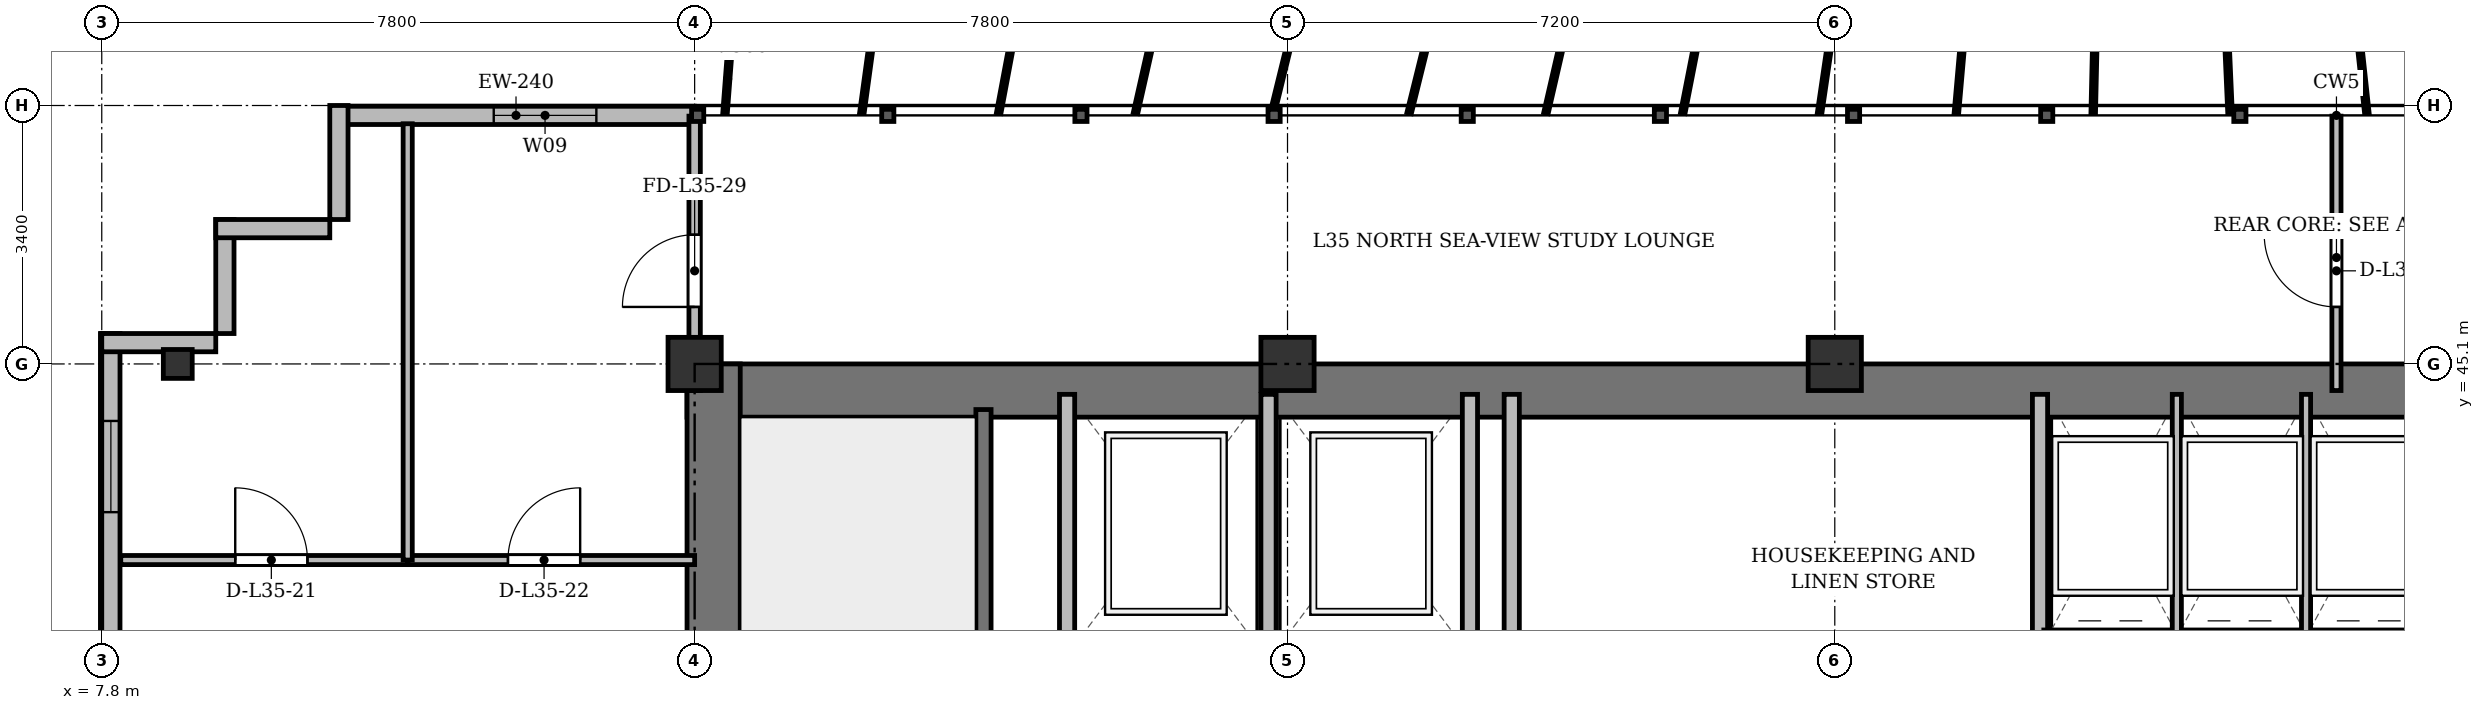
"""IFC4 building model, lengths in metres.
Left out: names, types, materials, properties, quantities, classifications, styles, units other than length and angle.
Written with IfcOpenShell. Run it as: python <this file> out.ifc"""

import sys

from ifc_helpers import new_model, si_unit, direction, frame, frame_2d, origin, origin_2d, place, context, subcontext, project, spatial, rectangle, i_section, extrude, source, transform, mapped, element, fill, save


model = new_model("IFC4")
c1 = context("Model", 3, precision=1e-05, world=origin(), true_north=direction((0.0, 1.0)))
c2 = subcontext(c1, "Body", "Model", "MODEL_VIEW")
j1 = project(units=[si_unit("LENGTHUNIT", "METRE"), si_unit("PLANEANGLEUNIT", "RADIAN")], contexts=[c1])
p1 = place(None, origin())
s1 = spatial("IfcSite", under=j1, at=p1, CompositionType="ELEMENT")
p2 = place(p1, origin())
s2 = spatial("IfcBuilding", under=s1, at=p2, CompositionType="ELEMENT")
p3 = place(p2, frame((0.0, 0.0, 135.7)))
s3 = spatial("IfcBuildingStorey", under=s2, at=p3, CompositionType="ELEMENT", Elevation=135.7)
m1 = source(origin(), c2, "Body", "SweptSolid", [
    extrude(i_section(OverallWidth=0.38, OverallDepth=0.38, WebThickness=0.02, FlangeThickness=0.03, at=origin_2d()), origin(), (0.0, 0.0, 1.0), 3.6),
])
p4 = place(p3, frame((8.8, 45.1, 0.0), z_axis=(0.0, 0.0, 1.0), x_axis=(1.0, 0.0, 0.0)))
e1 = element("IfcColumn", 1, at=p4, inside=s3, PredefinedType="COLUMN", context=c2, shape_type="MappedRepresentation", body=[
    mapped(m1, transform((0.0, 0.0, 0.0), x_axis=(1.0, 0.0, 0.0), y_axis=(0.0, 1.0, 0.0), z_axis=(0.0, 0.0, 1.0), scale=1.0)),
])
m2 = source(origin(), c2, "Body", "SweptSolid", [
    extrude(rectangle(XDim=0.7, YDim=0.7, at=origin_2d()), origin(), (0.0, 0.0, 1.0), 3.6),
])
for number, where, z_axis, x_axis in (
    (2, (15.6, 45.1, 0.0), (0.0, 0.0, 1.0), (1.0, 0.0, 0.0)),
    (3, (23.4, 45.1, 0.0), (0.0, 0.0, 1.0), (1.0, 0.0, 0.0)),
    (4, (30.6, 45.1, 0.0), (0.0, 0.0, 1.0), (1.0, 0.0, 0.0)),
):
    element("IfcColumn", number, at=place(p3, frame(where, z_axis=z_axis, x_axis=x_axis)), inside=s3, PredefinedType="COLUMN", context=c2, shape_type="MappedRepresentation", body=[
        mapped(m2, transform((0.0, 0.0, 0.0), x_axis=(1.0, 0.0, 0.0), y_axis=(0.0, 1.0, 0.0), z_axis=(0.0, 0.0, 1.0), scale=1.0)),
    ])
p5 = place(p3, frame((10.9, 48.37, 0.0), z_axis=(0.0, 0.0, 1.0), x_axis=(1.0, 0.0, 0.0)))
e5 = element("IfcWall", 5, at=p5, inside=s3, PredefinedType="SOLIDWALL", context=c2, shape_type="SweptSolid", body=[
    extrude(rectangle(XDim=4.7, YDim=0.24, at=frame_2d((2.35, 0.0))), origin(), (0.0, 0.0, 1.0), 3.35),
])
p6 = place(p5, frame((2.057, 0.0, 0.9)))
e6 = element("IfcOpeningElement", 6, at=p6, cuts=e5, PredefinedType="OPENING", context=c2, shape_type="SweptSolid", body=[
    extrude(rectangle(XDim=1.35, YDim=1.5, at=frame_2d((0.675, 0.75))), frame((0.0, 0.13, 0.0), z_axis=(0.0, -1.0, 0.0), x_axis=(1.0, 0.0, 0.0)), (0.0, 0.0, 1.0), 0.26),
])
p7 = place(p3, frame((7.92, 6.3, 0.0), z_axis=(0.0, 0.0, 1.0), x_axis=(0.0, 1.0, 0.0)))
e7 = element("IfcWall", 7, at=p7, inside=s3, PredefinedType="SOLIDWALL", context=c2, shape_type="SweptSolid", body=[
    extrude(rectangle(XDim=39.2, YDim=0.24, at=frame_2d((19.6, 0.0))), origin(), (0.0, 0.0, 1.0), 3.35),
])
p8 = place(p7, frame((1.45, 0.0, 0.92)))
e8 = element("IfcOpeningElement", 8, at=p8, cuts=e7, PredefinedType="OPENING", context=c2, shape_type="SweptSolid", body=[
    extrude(rectangle(XDim=1.2, YDim=1.65, at=frame_2d((0.6, 0.825))), frame((0.0, 0.13, 0.0), z_axis=(0.0, -1.0, 0.0), x_axis=(1.0, 0.0, 0.0)), (0.0, 0.0, 1.0), 0.26),
])
p9 = place(p7, frame((3.9, 0.0, 0.92)))
e9 = element("IfcOpeningElement", 9, at=p9, cuts=e7, PredefinedType="OPENING", context=c2, shape_type="SweptSolid", body=[
    extrude(rectangle(XDim=2.4, YDim=2.1, at=frame_2d((1.2, 1.05))), frame((0.0, 0.13, 0.0), z_axis=(0.0, -1.0, 0.0), x_axis=(1.0, 0.0, 0.0)), (0.0, 0.0, 1.0), 0.26),
])
p10 = place(p7, frame((8.1, 0.0, 0.92)))
e10 = element("IfcOpeningElement", 10, at=p10, cuts=e7, PredefinedType="OPENING", context=c2, shape_type="SweptSolid", body=[
    extrude(rectangle(XDim=2.4, YDim=2.1, at=frame_2d((1.2, 1.05))), frame((0.0, 0.13, 0.0), z_axis=(0.0, -1.0, 0.0), x_axis=(1.0, 0.0, 0.0)), (0.0, 0.0, 1.0), 0.26),
])
p11 = place(p7, frame((15.3, 0.0, 0.92)))
e11 = element("IfcOpeningElement", 11, at=p11, cuts=e7, PredefinedType="OPENING", context=c2, shape_type="SweptSolid", body=[
    extrude(rectangle(XDim=2.4, YDim=2.1, at=frame_2d((1.2, 1.05))), frame((0.0, 0.13, 0.0), z_axis=(0.0, -1.0, 0.0), x_axis=(1.0, 0.0, 0.0)), (0.0, 0.0, 1.0), 0.26),
])
p12 = place(p7, frame((33.5, 0.0, 0.92)))
e12 = element("IfcOpeningElement", 12, at=p12, cuts=e7, PredefinedType="OPENING", context=c2, shape_type="SweptSolid", body=[
    extrude(rectangle(XDim=1.2, YDim=1.65, at=frame_2d((0.6, 0.825))), frame((0.0, 0.13, 0.0), z_axis=(0.0, -1.0, 0.0), x_axis=(1.0, 0.0, 0.0)), (0.0, 0.0, 1.0), 0.26),
])
p13 = place(p7, frame((36.85, 0.0, 0.92)))
e13 = element("IfcOpeningElement", 13, at=p13, cuts=e7, PredefinedType="OPENING", context=c2, shape_type="SweptSolid", body=[
    extrude(rectangle(XDim=1.2, YDim=1.65, at=frame_2d((0.6, 0.825))), frame((0.0, 0.13, 0.0), z_axis=(0.0, -1.0, 0.0), x_axis=(1.0, 0.0, 0.0)), (0.0, 0.0, 1.0), 0.26),
])
for number, where, z_axis, x_axis in (
    (14, (7.8, 45.38, 0.0), (0.0, 0.0, 1.0), (1.0, 0.0, 0.0)),
    (15, (9.42, 45.5, 0.0), (0.0, 0.0, 1.0), (0.0, 1.0, 0.0)),
    (16, (9.3, 46.88, 0.0), (0.0, 0.0, 1.0), (1.0, 0.0, 0.0)),
    (17, (10.92, 47.0, 0.0), (0.0, 0.0, 1.0), (0.0, 1.0, 0.0)),
):
    element("IfcWall", number, at=place(p3, frame(where, z_axis=z_axis, x_axis=x_axis)), inside=s3, PredefinedType="SOLIDWALL", context=c2, shape_type="SweptSolid", body=[
        extrude(rectangle(XDim=1.5, YDim=0.24, at=frame_2d((0.75, 0.0))), origin(), (0.0, 0.0, 1.0), 3.35),
    ])
p14 = place(p3, frame((15.5, 44.75, 0.0), z_axis=(0.0, 0.0, 1.0), x_axis=(1.0, 0.0, 0.0)))
e18 = element("IfcWall", 18, at=p14, inside=s3, PredefinedType="SHEAR", context=c2, shape_type="SweptSolid", body=[
    extrude(rectangle(XDim=43.4, YDim=0.7, at=frame_2d((21.7, 0.0))), origin(), (0.0, 0.0, 1.0), 3.35),
])
p15 = place(p3, frame((15.85, 33.4, 0.0), z_axis=(0.0, 0.0, 1.0), x_axis=(0.0, 1.0, 0.0)))
e19 = element("IfcWall", 19, at=p15, inside=s3, PredefinedType="SHEAR", context=c2, shape_type="SweptSolid", body=[
    extrude(rectangle(XDim=11.7, YDim=0.7, at=frame_2d((5.85, 0.0))), origin(), (0.0, 0.0, 1.0), 3.35),
])
p16 = place(p3, frame((19.4, 33.4, 0.0), z_axis=(0.0, 0.0, 1.0), x_axis=(0.0, 1.0, 0.0)))
e20 = element("IfcWall", 20, at=p16, inside=s3, PredefinedType="SHEAR", context=c2, shape_type="SweptSolid", body=[
    extrude(rectangle(XDim=11.1, YDim=0.2, at=frame_2d((5.55, 0.0))), origin(), (0.0, 0.0, 1.0), 3.35),
])
p17 = place(p16, frame((0.85, 0.0, 0.0)))
e21 = element("IfcOpeningElement", 21, at=p17, cuts=e20, PredefinedType="OPENING", context=c2, shape_type="SweptSolid", body=[
    extrude(rectangle(XDim=1.1, YDim=2.15, at=frame_2d((0.55, 1.075))), frame((0.0, 0.11, 0.0), z_axis=(0.0, -1.0, 0.0), x_axis=(1.0, 0.0, 0.0)), (0.0, 0.0, 1.0), 0.22),
])
for number, where, z_axis, x_axis in (
    (22, (20.5, 41.3, 0.0), (0.0, 0.0, 1.0), (0.0, 1.0, 0.0)),
    (23, (23.15, 41.3, 0.0), (0.0, 0.0, 1.0), (0.0, 1.0, 0.0)),
    (24, (25.8, 41.3, 0.0), (0.0, 0.0, 1.0), (0.0, 1.0, 0.0)),
):
    element("IfcWall", number, at=place(p3, frame(where, z_axis=z_axis, x_axis=x_axis)), inside=s3, PredefinedType="SOLIDWALL", context=c2, shape_type="SweptSolid", body=[
        extrude(rectangle(XDim=3.4, YDim=0.2, at=frame_2d((1.7, 0.0))), origin(), (0.0, 0.0, 1.0), 3.35),
    ])
for number, where, z_axis, x_axis in (
    (25, (26.35, 33.4, 0.0), (0.0, 0.0, 1.0), (0.0, 1.0, 0.0)),
    (26, (33.3, 33.4, 0.0), (0.0, 0.0, 1.0), (0.0, 1.0, 0.0)),
):
    element("IfcWall", number, at=place(p3, frame(where, z_axis=z_axis, x_axis=x_axis)), inside=s3, PredefinedType="SOLIDWALL", context=c2, shape_type="SweptSolid", body=[
        extrude(rectangle(XDim=11.3, YDim=0.2, at=frame_2d((5.65, 0.0))), origin(), (0.0, 0.0, 1.0), 2.75),
    ])
for number, where, z_axis, x_axis in (
    (27, (35.1, 41.5, 0.0), (0.0, 0.0, 1.0), (0.0, 1.0, 0.0)),
    (28, (36.8, 41.5, 0.0), (0.0, 0.0, 1.0), (0.0, 1.0, 0.0)),
):
    element("IfcWall", number, at=place(p3, frame(where, z_axis=z_axis, x_axis=x_axis)), inside=s3, PredefinedType="PARTITIONING", context=c2, shape_type="SweptSolid", body=[
        extrude(rectangle(XDim=3.2, YDim=0.12, at=frame_2d((1.6, 0.0))), origin(), (0.0, 0.0, 1.0), 3.35),
    ])
p18 = place(p3, frame((8.05, 42.52, 0.0), z_axis=(0.0, 0.0, 1.0), x_axis=(1.0, 0.0, 0.0)))
e29 = element("IfcWall", 29, at=p18, inside=s3, PredefinedType="PARTITIONING", context=c2, shape_type="SweptSolid", body=[
    extrude(rectangle(XDim=3.775, YDim=0.12, at=frame_2d((1.887, 0.0))), origin(), (0.0, 0.0, 1.0), 2.85),
])
p19 = place(p18, frame((1.506, 0.0, 0.0)))
e30 = element("IfcOpeningElement", 30, at=p19, cuts=e29, PredefinedType="OPENING", context=c2, shape_type="SweptSolid", body=[
    extrude(rectangle(XDim=0.95, YDim=2.15, at=frame_2d((0.475, 1.075))), frame((0.0, 0.07, 0.0), z_axis=(0.0, -1.0, 0.0), x_axis=(1.0, 0.0, 0.0)), (0.0, 0.0, 1.0), 0.14),
])
p20 = place(p3, frame((11.825, 42.52, 0.0), z_axis=(0.0, 0.0, 1.0), x_axis=(1.0, 0.0, 0.0)))
e31 = element("IfcWall", 31, at=p20, inside=s3, PredefinedType="PARTITIONING", context=c2, shape_type="SweptSolid", body=[
    extrude(rectangle(XDim=3.775, YDim=0.12, at=frame_2d((1.888, 0.0))), origin(), (0.0, 0.0, 1.0), 2.85),
])
p21 = place(p20, frame((1.319, 0.0, 0.0)))
e32 = element("IfcOpeningElement", 32, at=p21, cuts=e31, PredefinedType="OPENING", context=c2, shape_type="SweptSolid", body=[
    extrude(rectangle(XDim=0.95, YDim=2.15, at=frame_2d((0.475, 1.075))), frame((0.0, 0.07, 0.0), z_axis=(0.0, -1.0, 0.0), x_axis=(1.0, 0.0, 0.0)), (0.0, 0.0, 1.0), 0.14),
])
p22 = place(p3, frame((11.825, 42.52, 0.0), z_axis=(0.0, 0.0, 1.0), x_axis=(0.0, 1.0, 0.0)))
e33 = element("IfcWall", 33, at=p22, inside=s3, PredefinedType="PARTITIONING", context=c2, shape_type="SweptSolid", body=[
    extrude(rectangle(XDim=5.74, YDim=0.12, at=frame_2d((2.87, 0.0))), origin(), (0.0, 0.0, 1.0), 2.75),
])
p23 = place(p3, frame((37.2, 44.75, 0.0), z_axis=(0.0, 0.0, 1.0), x_axis=(0.0, 1.0, 0.0)))
e34 = element("IfcWall", 34, at=p23, inside=s3, PredefinedType="PARTITIONING", context=c2, shape_type="SweptSolid", body=[
    extrude(rectangle(XDim=3.61, YDim=0.12, at=frame_2d((1.805, 0.0))), origin(), (0.0, 0.0, 1.0), 2.75),
])
p24 = place(p23, frame((1.1, 0.0, 0.0)))
e35 = element("IfcOpeningElement", 35, at=p24, cuts=e34, PredefinedType="OPENING", context=c2, shape_type="SweptSolid", body=[
    extrude(rectangle(XDim=0.95, YDim=2.15, at=frame_2d((0.475, 1.075))), frame((0.0, 0.07, 0.0), z_axis=(0.0, -1.0, 0.0), x_axis=(1.0, 0.0, 0.0)), (0.0, 0.0, 1.0), 0.14),
])
p25 = place(p3, frame((15.6, 44.75, 0.0), z_axis=(0.0, 0.0, 1.0), x_axis=(0.0, 1.0, 0.0)))
e36 = element("IfcWall", 36, at=p25, inside=s3, PredefinedType="PARTITIONING", context=c2, shape_type="SweptSolid", body=[
    extrude(rectangle(XDim=3.61, YDim=0.15, at=frame_2d((1.805, 0.0))), origin(), (0.0, 0.0, 1.0), 2.85),
])
p26 = place(p25, frame((1.1, 0.0, 0.0)))
e37 = element("IfcOpeningElement", 37, at=p26, cuts=e36, PredefinedType="OPENING", context=c2, shape_type="SweptSolid", body=[
    extrude(rectangle(XDim=0.95, YDim=2.15, at=frame_2d((0.475, 1.075))), frame((0.0, 0.085, 0.0), z_axis=(0.0, -1.0, 0.0), x_axis=(1.0, 0.0, 0.0)), (0.0, 0.0, 1.0), 0.17),
])
m3 = source(origin(), c2, "Body", "SweptSolid", [
    extrude(rectangle(XDim=1.35, YDim=1.5, at=frame_2d((0.675, 0.75))), frame((0.0, 0.03, 0.0), z_axis=(0.0, -1.0, 0.0), x_axis=(1.0, 0.0, 0.0)), (0.0, 0.0, 1.0), 0.06),
])
p27 = place(p6, origin())
e38 = element("IfcWindow", 38, at=p27, inside=s3, PartitioningType="SINGLE_PANEL", PredefinedType="WINDOW", context=c2, shape_type="MappedRepresentation", body=[
    mapped(m3, transform((0.0, 0.0, 0.0), x_axis=(1.0, 0.0, 0.0), y_axis=(0.0, 1.0, 0.0), z_axis=(0.0, 0.0, 1.0), scale=1.0)),
])
fill(e6, e38)
m4 = source(origin(), c2, "Body", "SweptSolid", [
    extrude(rectangle(XDim=1.2, YDim=1.65, at=frame_2d((0.6, 0.825))), frame((0.0, 0.03, 0.0), z_axis=(0.0, -1.0, 0.0), x_axis=(1.0, 0.0, 0.0)), (0.0, 0.0, 1.0), 0.06),
])
p28 = place(p13, origin())
e39 = element("IfcWindow", 39, at=p28, inside=s3, PartitioningType="SINGLE_PANEL", PredefinedType="WINDOW", context=c2, shape_type="MappedRepresentation", body=[
    mapped(m4, transform((0.0, 0.0, 0.0), x_axis=(1.0, 0.0, 0.0), y_axis=(0.0, 1.0, 0.0), z_axis=(0.0, 0.0, 1.0), scale=1.0)),
])
fill(e13, e39)
m5 = source(origin(), c2, "Body", "SweptSolid", [
    extrude(rectangle(XDim=0.95, YDim=2.15, at=frame_2d((0.475, 1.075))), frame((0.0, 0.025, 0.0), z_axis=(0.0, -1.0, 0.0), x_axis=(1.0, 0.0, 0.0)), (0.0, 0.0, 1.0), 0.05),
])
p29 = place(p19, origin())
e40 = element("IfcDoor", 40, at=p29, inside=s3, OperationType="SINGLE_SWING_LEFT", PredefinedType="DOOR", context=c2, shape_type="MappedRepresentation", body=[
    mapped(m5, transform((0.0, 0.0, 0.0), x_axis=(1.0, 0.0, 0.0), y_axis=(0.0, 1.0, 0.0), z_axis=(0.0, 0.0, 1.0), scale=1.0)),
])
fill(e30, e40)
p30 = place(p21, origin())
e41 = element("IfcDoor", 41, at=p30, inside=s3, OperationType="SINGLE_SWING_RIGHT", PredefinedType="DOOR", context=c2, shape_type="MappedRepresentation", body=[
    mapped(m5, transform((0.0, 0.0, 0.0), x_axis=(1.0, 0.0, 0.0), y_axis=(0.0, 1.0, 0.0), z_axis=(0.0, 0.0, 1.0), scale=1.0)),
])
fill(e32, e41)
p31 = place(p24, origin())
e42 = element("IfcDoor", 42, at=p31, inside=s3, OperationType="SINGLE_SWING_RIGHT", PredefinedType="DOOR", context=c2, shape_type="MappedRepresentation", body=[
    mapped(m5, transform((0.0, 0.0, 0.0), x_axis=(1.0, 0.0, 0.0), y_axis=(0.0, 1.0, 0.0), z_axis=(0.0, 0.0, 1.0), scale=1.0)),
])
fill(e35, e42)
p32 = place(p26, origin())
e43 = element("IfcDoor", 43, at=p32, inside=s3, OperationType="SINGLE_SWING_LEFT", PredefinedType="DOOR", context=c2, shape_type="MappedRepresentation", body=[
    mapped(m5, transform((0.0, 0.0, 0.0), x_axis=(1.0, 0.0, 0.0), y_axis=(0.0, 1.0, 0.0), z_axis=(0.0, 0.0, 1.0), scale=1.0)),
])
fill(e37, e43)
save(model, sys.argv[1])
